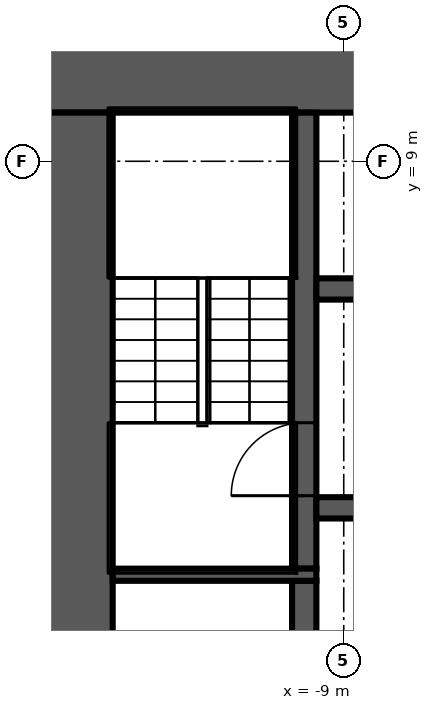
"""IFC4 building model, lengths in metres.
Left out: names, types, materials, properties, quantities, classifications, styles, units other than length and angle.
Written with IfcOpenShell. Run it as: python <this file> out.ifc"""

import sys

from ifc_helpers import new_model, si_unit, direction, frame, frame_2d, origin, place, context, subcontext, project, spatial, rectangle, extrude, element, fill, save


model = new_model("IFC4")
c1 = context("Model", 3, precision=1e-05, world=origin(), true_north=direction((0.0, 1.0)))
c2 = subcontext(c1, "Body", "Model", "MODEL_VIEW")
j1 = project(units=[si_unit("LENGTHUNIT", "METRE"), si_unit("PLANEANGLEUNIT", "RADIAN")], contexts=[c1])
p1 = place(None, origin())
s1 = spatial("IfcSite", under=j1, at=p1, CompositionType="ELEMENT")
p2 = place(p1, origin())
s2 = spatial("IfcBuilding", under=s1, at=p2, CompositionType="ELEMENT")
p3 = place(p2, frame((0.0, 0.0, -17.0)))
s3 = spatial("IfcBuildingStorey", under=s2, at=p3, CompositionType="ELEMENT", Elevation=-17.0)
p4 = place(p3, frame((-14.0, 10.4, 0.0), z_axis=(0.0, 0.0, 1.0), x_axis=(1.0, 0.0, 0.0)))
e1 = element("IfcWall", 1, at=p4, inside=s3, PredefinedType="SHEAR", context=c2, shape_type="SweptSolid", body=[
    extrude(rectangle(XDim=28.0, YDim=1.2, at=frame_2d((14.0, 0.0))), origin(), (0.0, 0.0, 1.0), 5.1),
])
p5 = place(p4, frame((15.9, 0.0, 0.0)))
e2 = element("IfcOpeningElement", 2, at=p5, cuts=e1, PredefinedType="OPENING", context=c2, shape_type="SweptSolid", body=[
    extrude(rectangle(XDim=1.6, YDim=2.1, at=frame_2d((0.8, 1.05))), frame((0.0, 0.61, 0.0), z_axis=(0.0, -1.0, 0.0), x_axis=(1.0, 0.0, 0.0)), (0.0, 0.0, 1.0), 1.22),
])
p6 = place(p3, frame((-13.4, -9.8, 0.0), z_axis=(0.0, 0.0, 1.0), x_axis=(0.0, 1.0, 0.0)))
e3 = element("IfcWall", 3, at=p6, inside=s3, PredefinedType="SHEAR", context=c2, shape_type="SweptSolid", body=[
    extrude(rectangle(XDim=19.6, YDim=1.2, at=frame_2d((9.8, 0.0))), origin(), (0.0, 0.0, 1.0), 5.1),
])
p7 = place(p3, frame((-9.65, -2.1, 0.0), z_axis=(0.0, 0.0, 1.0), x_axis=(0.0, 1.0, 0.0)))
e4 = element("IfcWall", 4, at=p7, inside=s3, PredefinedType="SHEAR", context=c2, shape_type="SweptSolid", body=[
    extrude(rectangle(XDim=4.2, YDim=0.4, at=frame_2d((2.1, 0.0))), origin(), (0.0, 0.0, 1.0), 5.1),
])
p8 = place(p3, frame((-9.65, 2.3, 0.0), z_axis=(0.0, 0.0, 1.0), x_axis=(0.0, 1.0, 0.0)))
e5 = element("IfcWall", 5, at=p8, inside=s3, PredefinedType="SHEAR", context=c2, shape_type="SweptSolid", body=[
    extrude(rectangle(XDim=7.5, YDim=0.4, at=frame_2d((3.75, 0.0))), origin(), (0.0, 0.0, 1.0), 5.1),
])
p9 = place(p8, frame((1.2, 0.0, 0.0)))
e6 = element("IfcOpeningElement", 6, at=p9, cuts=e5, PredefinedType="OPENING", context=c2, shape_type="SweptSolid", body=[
    extrude(rectangle(XDim=1.2, YDim=2.1, at=frame_2d((0.6, 1.05))), frame((0.0, 0.21, 0.0), z_axis=(0.0, -1.0, 0.0), x_axis=(1.0, 0.0, 0.0)), (0.0, 0.0, 1.0), 0.42),
])
p10 = place(p3, frame((-9.45, 2.2, 0.0), z_axis=(0.0, 0.0, 1.0), x_axis=(-1.0, 0.0, 0.0)))
e7 = element("IfcWall", 7, at=p10, inside=s3, PredefinedType="SHEAR", context=c2, shape_type="SweptSolid", body=[
    extrude(rectangle(XDim=3.35, YDim=0.2, at=frame_2d((1.675, 0.0))), origin(), (0.0, 0.0, 1.0), 5.1),
])
p11 = place(p3, frame((-9.45, 6.9, 0.0), z_axis=(0.0, 0.0, 1.0), x_axis=(1.0, 0.0, 0.0)))
e8 = element("IfcWall", 8, at=p11, inside=s3, PredefinedType="SHEAR", context=c2, shape_type="SweptSolid", body=[
    extrude(rectangle(XDim=18.9, YDim=0.35, at=frame_2d((9.45, 0.0))), origin(), (0.0, 0.0, 1.0), 5.1),
])
p12 = place(p11, frame((0.8, 0.0, 0.0)))
e9 = element("IfcOpeningElement", 9, at=p12, cuts=e8, PredefinedType="OPENING", context=c2, shape_type="SweptSolid", body=[
    extrude(rectangle(XDim=1.1, YDim=2.1, at=frame_2d((0.55, 1.05))), frame((0.0, 0.185, 0.0), z_axis=(0.0, -1.0, 0.0), x_axis=(1.0, 0.0, 0.0)), (0.0, 0.0, 1.0), 0.37),
])
p13 = place(p11, frame((3.5, 0.0, 0.0)))
e10 = element("IfcOpeningElement", 10, at=p13, cuts=e8, PredefinedType="OPENING", context=c2, shape_type="SweptSolid", body=[
    extrude(rectangle(XDim=1.1, YDim=2.1, at=frame_2d((0.55, 1.05))), frame((0.0, 0.185, 0.0), z_axis=(0.0, -1.0, 0.0), x_axis=(1.0, 0.0, 0.0)), (0.0, 0.0, 1.0), 0.37),
])
p14 = place(p11, frame((6.2, 0.0, 0.0)))
e11 = element("IfcOpeningElement", 11, at=p14, cuts=e8, PredefinedType="OPENING", context=c2, shape_type="SweptSolid", body=[
    extrude(rectangle(XDim=1.1, YDim=2.1, at=frame_2d((0.55, 1.05))), frame((0.0, 0.185, 0.0), z_axis=(0.0, -1.0, 0.0), x_axis=(1.0, 0.0, 0.0)), (0.0, 0.0, 1.0), 0.37),
])
p15 = place(p11, frame((8.9, 0.0, 0.0)))
e12 = element("IfcOpeningElement", 12, at=p15, cuts=e8, PredefinedType="OPENING", context=c2, shape_type="SweptSolid", body=[
    extrude(rectangle(XDim=1.1, YDim=2.1, at=frame_2d((0.55, 1.05))), frame((0.0, 0.185, 0.0), z_axis=(0.0, -1.0, 0.0), x_axis=(1.0, 0.0, 0.0)), (0.0, 0.0, 1.0), 0.37),
])
p16 = place(p11, frame((11.55, 0.0, 0.0)))
e13 = element("IfcOpeningElement", 13, at=p16, cuts=e8, PredefinedType="OPENING", context=c2, shape_type="SweptSolid", body=[
    extrude(rectangle(XDim=1.2, YDim=2.1, at=frame_2d((0.6, 1.05))), frame((0.0, 0.185, 0.0), z_axis=(0.0, -1.0, 0.0), x_axis=(1.0, 0.0, 0.0)), (0.0, 0.0, 1.0), 0.37),
])
p17 = place(p11, frame((14.3, 0.0, 0.0)))
e14 = element("IfcOpeningElement", 14, at=p17, cuts=e8, PredefinedType="OPENING", context=c2, shape_type="SweptSolid", body=[
    extrude(rectangle(XDim=1.1, YDim=2.1, at=frame_2d((0.55, 1.05))), frame((0.0, 0.185, 0.0), z_axis=(0.0, -1.0, 0.0), x_axis=(1.0, 0.0, 0.0)), (0.0, 0.0, 1.0), 0.37),
])
p18 = place(p11, frame((17.0, 0.0, 0.0)))
e15 = element("IfcOpeningElement", 15, at=p18, cuts=e8, PredefinedType="OPENING", context=c2, shape_type="SweptSolid", body=[
    extrude(rectangle(XDim=1.1, YDim=2.1, at=frame_2d((0.55, 1.05))), frame((0.0, 0.185, 0.0), z_axis=(0.0, -1.0, 0.0), x_axis=(1.0, 0.0, 0.0)), (0.0, 0.0, 1.0), 0.37),
])
p19 = place(p3, frame((9.45, 3.3, 0.0), z_axis=(0.0, 0.0, 1.0), x_axis=(-1.0, 0.0, 0.0)))
e16 = element("IfcWall", 16, at=p19, inside=s3, PredefinedType="SHEAR", context=c2, shape_type="SweptSolid", body=[
    extrude(rectangle(XDim=18.9, YDim=0.35, at=frame_2d((9.45, 0.0))), origin(), (0.0, 0.0, 1.0), 5.1),
])
p20 = place(p19, frame((6.2, 0.0, 0.0)))
e17 = element("IfcOpeningElement", 17, at=p20, cuts=e16, PredefinedType="OPENING", context=c2, shape_type="SweptSolid", body=[
    extrude(rectangle(XDim=1.1, YDim=2.1, at=frame_2d((0.55, 1.05))), frame((0.0, 0.185, 0.0), z_axis=(0.0, -1.0, 0.0), x_axis=(1.0, 0.0, 0.0)), (0.0, 0.0, 1.0), 0.37),
])
p21 = place(p19, frame((3.5, 0.0, 0.0)))
e18 = element("IfcOpeningElement", 18, at=p21, cuts=e16, PredefinedType="OPENING", context=c2, shape_type="SweptSolid", body=[
    extrude(rectangle(XDim=1.1, YDim=2.1, at=frame_2d((0.55, 1.05))), frame((0.0, 0.185, 0.0), z_axis=(0.0, -1.0, 0.0), x_axis=(1.0, 0.0, 0.0)), (0.0, 0.0, 1.0), 0.37),
])
p22 = place(p19, frame((0.9, 0.0, 0.0)))
e19 = element("IfcOpeningElement", 19, at=p22, cuts=e16, PredefinedType="OPENING", context=c2, shape_type="SweptSolid", body=[
    extrude(rectangle(XDim=0.9, YDim=2.1, at=frame_2d((0.45, 1.05))), frame((0.0, 0.185, 0.0), z_axis=(0.0, -1.0, 0.0), x_axis=(1.0, 0.0, 0.0)), (0.0, 0.0, 1.0), 0.37),
])
p23 = place(p9, origin())
e20 = element("IfcDoor", 20, at=p23, inside=s3, OperationType="SINGLE_SWING_RIGHT", PredefinedType="DOOR", context=c2, shape_type="SweptSolid", body=[
    extrude(rectangle(XDim=1.2, YDim=2.1, at=frame_2d((0.6, 1.05))), frame((0.0, 0.025, 0.0), z_axis=(0.0, -1.0, 0.0), x_axis=(1.0, 0.0, 0.0)), (0.0, 0.0, 1.0), 0.05),
])
fill(e6, e20)
save(model, sys.argv[1])
